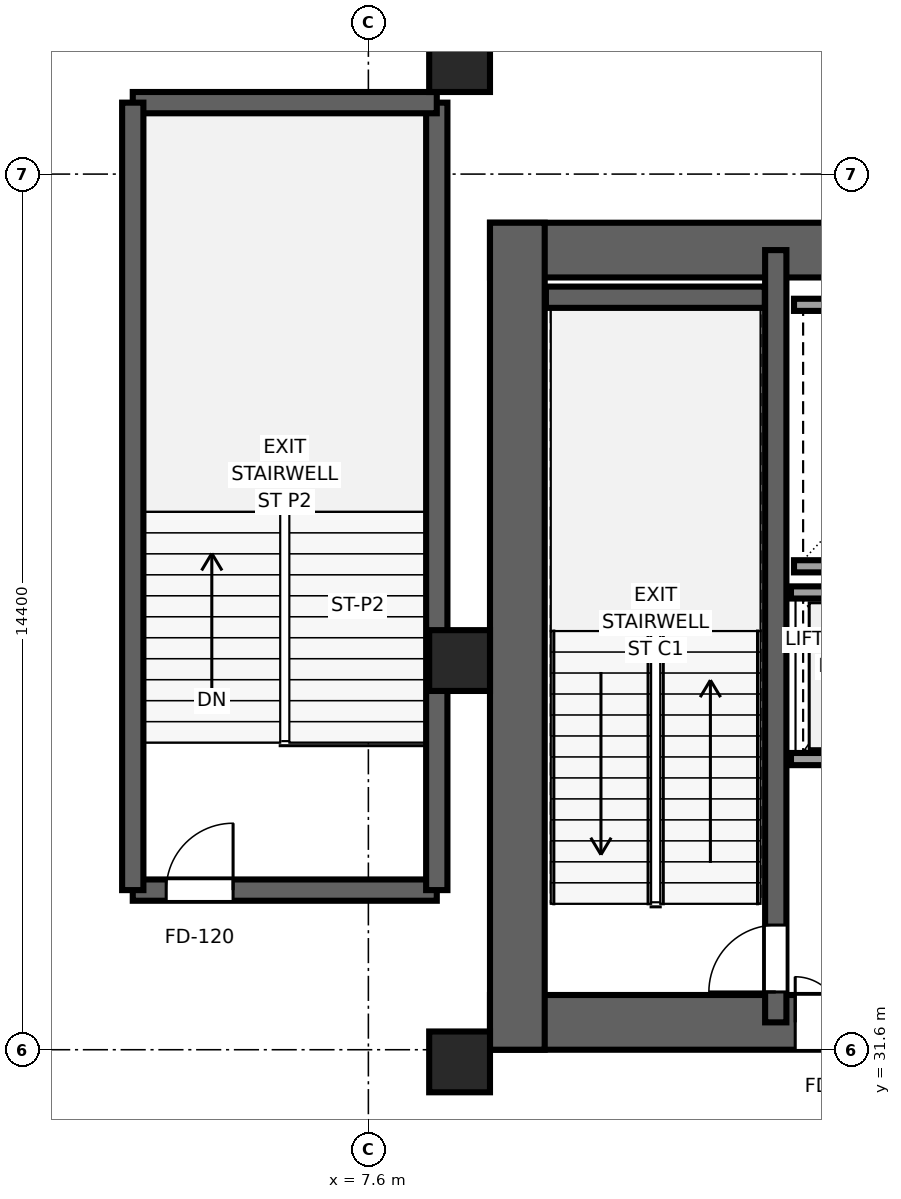
"""IFC4 building model, lengths in metres.
Left out: names, types, materials, properties, quantities, classifications, styles, units other than length and angle.
Written with IfcOpenShell. Run it as: python <this file> out.ifc"""

import sys

from ifc_helpers import new_model, si_unit, direction, frame, frame_2d, origin, origin_2d, place, context, subcontext, project, spatial, rectangle, extrude, source, transform, mapped, element, fill, save


model = new_model("IFC4")
c1 = context("Model", 3, precision=1e-05, world=origin(), true_north=direction((0.0, 1.0)))
c2 = subcontext(c1, "Body", "Model", "MODEL_VIEW")
j1 = project(units=[si_unit("LENGTHUNIT", "METRE"), si_unit("PLANEANGLEUNIT", "RADIAN")], contexts=[c1])
p1 = place(None, origin())
s1 = spatial("IfcSite", under=j1, at=p1, CompositionType="ELEMENT")
p2 = place(p1, origin())
s2 = spatial("IfcBuilding", under=s1, at=p2, CompositionType="ELEMENT")
p3 = place(p2, frame((0.0, 0.0, 26.8)))
s3 = spatial("IfcBuildingStorey", under=s2, at=p3, CompositionType="ELEMENT", Elevation=26.8)
p4 = place(p3, frame((9.6, 32.05, 0.0), z_axis=(0.0, 0.0, 1.0), x_axis=(1.0, 0.0, 0.0)))
e1 = element("IfcWall", 1, at=p4, inside=s3, PredefinedType="SHEAR", context=c2, shape_type="SweptSolid", body=[
    extrude(rectangle(XDim=26.8, YDim=0.9, at=frame_2d((13.4, 0.0))), origin(), (0.0, 0.0, 1.0), 5.2),
])
p5 = place(p4, frame((6.52, 0.0, 0.0), z_axis=(0.0, 0.0, 1.0), x_axis=(-1.0, 0.0, 0.0)))
e2 = element("IfcOpeningElement", 2, at=p5, cuts=e1, PredefinedType="OPENING", context=c2, shape_type="SweptSolid", body=[
    extrude(rectangle(XDim=1.5, YDim=2.04, at=frame_2d((0.75, 1.02))), frame((0.0, 0.46, 0.0), z_axis=(0.0, -1.0, 0.0), x_axis=(1.0, 0.0, 0.0)), (0.0, 0.0, 1.0), 0.92),
])
p6 = place(p4, frame((14.15, 0.0, 0.0), z_axis=(0.0, 0.0, 1.0), x_axis=(-1.0, 0.0, 0.0)))
e3 = element("IfcOpeningElement", 3, at=p6, cuts=e1, PredefinedType="OPENING", context=c2, shape_type="SweptSolid", body=[
    extrude(rectangle(XDim=1.5, YDim=2.04, at=frame_2d((0.75, 1.02))), frame((0.0, 0.46, 0.0), z_axis=(0.0, -1.0, 0.0), x_axis=(1.0, 0.0, 0.0)), (0.0, 0.0, 1.0), 0.92),
])
p7 = place(p4, frame((21.78, 0.0, 0.0), z_axis=(0.0, 0.0, 1.0), x_axis=(-1.0, 0.0, 0.0)))
e4 = element("IfcOpeningElement", 4, at=p7, cuts=e1, PredefinedType="OPENING", context=c2, shape_type="SweptSolid", body=[
    extrude(rectangle(XDim=1.5, YDim=2.04, at=frame_2d((0.75, 1.02))), frame((0.0, 0.46, 0.0), z_axis=(0.0, -1.0, 0.0), x_axis=(1.0, 0.0, 0.0)), (0.0, 0.0, 1.0), 0.92),
])
p8 = place(p4, frame((8.57, 0.0, 0.0), z_axis=(0.0, 0.0, 1.0), x_axis=(-1.0, 0.0, 0.0)))
e5 = element("IfcOpeningElement", 5, at=p8, cuts=e1, PredefinedType="OPENING", context=c2, shape_type="SweptSolid", body=[
    extrude(rectangle(XDim=0.82, YDim=2.01, at=frame_2d((0.41, 1.005))), frame((0.0, 0.46, 0.0), z_axis=(0.0, -1.0, 0.0), x_axis=(1.0, 0.0, 0.0)), (0.0, 0.0, 1.0), 0.92),
])
p9 = place(p4, frame((19.07, 0.0, 0.0), z_axis=(0.0, 0.0, 1.0), x_axis=(-1.0, 0.0, 0.0)))
e6 = element("IfcOpeningElement", 6, at=p9, cuts=e1, PredefinedType="OPENING", context=c2, shape_type="SweptSolid", body=[
    extrude(rectangle(XDim=0.82, YDim=2.01, at=frame_2d((0.41, 1.005))), frame((0.0, 0.46, 0.0), z_axis=(0.0, -1.0, 0.0), x_axis=(1.0, 0.0, 0.0)), (0.0, 0.0, 1.0), 0.92),
])
p10 = place(p3, frame((9.6, 44.75, 0.0), z_axis=(0.0, 0.0, 1.0), x_axis=(1.0, 0.0, 0.0)))
e7 = element("IfcWall", 7, at=p10, inside=s3, PredefinedType="SHEAR", context=c2, shape_type="SweptSolid", body=[
    extrude(rectangle(XDim=26.8, YDim=0.9, at=frame_2d((13.4, 0.0))), origin(), (0.0, 0.0, 1.0), 5.2),
])
p11 = place(p3, frame((10.05, 31.6, 0.0), z_axis=(0.0, 0.0, 1.0), x_axis=(0.0, 1.0, 0.0)))
e8 = element("IfcWall", 8, at=p11, inside=s3, PredefinedType="SHEAR", context=c2, shape_type="SweptSolid", body=[
    extrude(rectangle(XDim=13.6, YDim=0.9, at=frame_2d((6.8, 0.0))), origin(), (0.0, 0.0, 1.0), 5.2),
])
p12 = place(p3, frame((14.3, 32.05, 0.0), z_axis=(0.0, 0.0, 1.0), x_axis=(0.0, 1.0, 0.0)))
e9 = element("IfcWall", 9, at=p12, inside=s3, PredefinedType="SHEAR", context=c2, shape_type="SweptSolid", body=[
    extrude(rectangle(XDim=12.7, YDim=0.35, at=frame_2d((6.35, 0.0))), origin(), (0.0, 0.0, 1.0), 5.2),
])
p13 = place(p12, frame((0.5, 0.0, 0.0)))
e10 = element("IfcOpeningElement", 10, at=p13, cuts=e9, PredefinedType="OPENING", context=c2, shape_type="SweptSolid", body=[
    extrude(rectangle(XDim=1.1, YDim=2.12, at=frame_2d((0.55, 1.06))), frame((0.0, 0.185, 0.0), z_axis=(0.0, -1.0, 0.0), x_axis=(1.0, 0.0, 0.0)), (0.0, 0.0, 1.0), 0.37),
])
p14 = place(p3, frame((10.52, 43.975, 0.0), z_axis=(0.0, 0.0, 1.0), x_axis=(1.0, 0.0, 0.0)))
e11 = element("IfcWall", 11, at=p14, inside=s3, PredefinedType="SHEAR", context=c2, shape_type="SweptSolid", body=[
    extrude(rectangle(XDim=3.6, YDim=0.35, at=frame_2d((1.8, 0.0))), origin(), (0.0, 0.0, 1.0), 5.2),
])
p15 = place(p3, frame((3.725, 34.225, 0.0), z_axis=(0.0, 0.0, 1.0), x_axis=(1.0, 0.0, 0.0)))
e12 = element("IfcWall", 12, at=p15, inside=s3, PredefinedType="SHEAR", context=c2, shape_type="SweptSolid", body=[
    extrude(rectangle(XDim=5.0, YDim=0.35, at=frame_2d((2.5, 0.0))), origin(), (0.0, 0.0, 1.0), 5.2),
])
p16 = place(p15, frame((0.55, 0.0, 0.0)))
e13 = element("IfcOpeningElement", 13, at=p16, cuts=e12, PredefinedType="OPENING", context=c2, shape_type="SweptSolid", body=[
    extrude(rectangle(XDim=1.1, YDim=2.12, at=frame_2d((0.55, 1.06))), frame((0.0, 0.185, 0.0), z_axis=(0.0, -1.0, 0.0), x_axis=(1.0, 0.0, 0.0)), (0.0, 0.0, 1.0), 0.37),
])
p17 = place(p3, frame((8.725, 34.225, 0.0), z_axis=(0.0, 0.0, 1.0), x_axis=(0.0, 1.0, 0.0)))
e14 = element("IfcWall", 14, at=p17, inside=s3, PredefinedType="SHEAR", context=c2, shape_type="SweptSolid", body=[
    extrude(rectangle(XDim=12.95, YDim=0.35, at=frame_2d((6.475, 0.0))), origin(), (0.0, 0.0, 1.0), 5.2),
])
p18 = place(p3, frame((8.725, 47.175, 0.0), z_axis=(0.0, 0.0, 1.0), x_axis=(-1.0, 0.0, 0.0)))
e15 = element("IfcWall", 15, at=p18, inside=s3, PredefinedType="SHEAR", context=c2, shape_type="SweptSolid", body=[
    extrude(rectangle(XDim=5.0, YDim=0.35, at=frame_2d((2.5, 0.0))), origin(), (0.0, 0.0, 1.0), 5.2),
])
p19 = place(p3, frame((3.725, 47.175, 0.0), z_axis=(0.0, 0.0, 1.0), x_axis=(0.0, -1.0, 0.0)))
e16 = element("IfcWall", 16, at=p19, inside=s3, PredefinedType="SHEAR", context=c2, shape_type="SweptSolid", body=[
    extrude(rectangle(XDim=12.95, YDim=0.35, at=frame_2d((6.475, 0.0))), origin(), (0.0, 0.0, 1.0), 5.2),
])
m1 = source(origin(), c2, "Body", "SweptSolid", [
    extrude(rectangle(XDim=1.0, YDim=1.0, at=origin_2d()), origin(), (0.0, 0.0, 1.0), 5.2),
])
for number, where, z_axis, x_axis in (
    (17, (9.1, 47.85, 0.0), (0.0, 0.0, 1.0), (1.0, 0.0, 0.0)),
    (18, (9.1, 38.0, 0.0), (0.0, 0.0, 1.0), (1.0, 0.0, 0.0)),
    (19, (9.1, 31.4, 0.0), (0.0, 0.0, 1.0), (1.0, 0.0, 0.0)),
):
    element("IfcColumn", number, at=place(p3, frame(where, z_axis=z_axis, x_axis=x_axis)), inside=s3, PredefinedType="COLUMN", context=c2, shape_type="MappedRepresentation", body=[
        mapped(m1, transform((0.0, 0.0, 0.0), x_axis=(1.0, 0.0, 0.0), y_axis=(0.0, 1.0, 0.0), z_axis=(0.0, 0.0, 1.0), scale=1.0)),
    ])
for number, where, z_axis, x_axis in (
    (20, (14.6, 39.55, 0.0), (0.0, 0.0, 1.0), (1.0, 0.0, 0.0)),
    (21, (14.6, 43.85, 0.0), (0.0, 0.0, 1.0), (1.0, 0.0, 0.0)),
):
    element("IfcWall", number, at=place(p3, frame(where, z_axis=z_axis, x_axis=x_axis)), inside=s3, PredefinedType="SOLIDWALL", context=c2, shape_type="SweptSolid", body=[
        extrude(rectangle(XDim=4.1, YDim=0.2, at=frame_2d((2.05, 0.0))), origin(), (0.0, 0.0, 1.0), 4.94),
    ])
p20 = place(p3, frame((14.55, 36.38, 0.0), z_axis=(0.0, 0.0, 1.0), x_axis=(1.0, 0.0, 0.0)))
e22 = element("IfcWall", 22, at=p20, inside=s3, PredefinedType="SOLIDWALL", context=c2, shape_type="SweptSolid", body=[
    extrude(rectangle(XDim=4.075, YDim=0.2, at=frame_2d((2.038, 0.0))), origin(), (0.0, 0.0, 1.0), 4.94),
])
p21 = place(p20, frame((0.55, 0.0, 0.0)))
e23 = element("IfcOpeningElement", 23, at=p21, cuts=e22, PredefinedType="OPENING", context=c2, shape_type="SweptSolid", body=[
    extrude(rectangle(XDim=1.1, YDim=2.12, at=frame_2d((0.55, 1.06))), frame((0.0, 0.11, 0.0), z_axis=(0.0, -1.0, 0.0), x_axis=(1.0, 0.0, 0.0)), (0.0, 0.0, 1.0), 0.22),
])
p22 = place(p20, frame((2.45, 0.0, 0.0)))
e24 = element("IfcOpeningElement", 24, at=p22, cuts=e22, PredefinedType="OPENING", context=c2, shape_type="SweptSolid", body=[
    extrude(rectangle(XDim=1.1, YDim=2.12, at=frame_2d((0.55, 1.06))), frame((0.0, 0.11, 0.0), z_axis=(0.0, -1.0, 0.0), x_axis=(1.0, 0.0, 0.0)), (0.0, 0.0, 1.0), 0.22),
])
p23 = place(p3, frame((14.55, 39.12, 0.0), z_axis=(0.0, 0.0, 1.0), x_axis=(1.0, 0.0, 0.0)))
e25 = element("IfcWall", 25, at=p23, inside=s3, PredefinedType="SOLIDWALL", context=c2, shape_type="SweptSolid", body=[
    extrude(rectangle(XDim=4.075, YDim=0.2, at=frame_2d((2.038, 0.0))), origin(), (0.0, 0.0, 1.0), 4.94),
])
m2 = source(origin(), c2, "Body", "SweptSolid", [
    extrude(rectangle(XDim=1.1, YDim=2.12, at=frame_2d((0.55, 1.06))), frame((0.0, 0.025, 0.0), z_axis=(0.0, -1.0, 0.0), x_axis=(1.0, 0.0, 0.0)), (0.0, 0.0, 1.0), 0.05),
])
p24 = place(p13, origin())
e26 = element("IfcDoor", 26, at=p24, inside=s3, OperationType="SINGLE_SWING_LEFT", PredefinedType="DOOR", context=c2, shape_type="MappedRepresentation", body=[
    mapped(m2, transform((0.0, 0.0, 0.0), x_axis=(1.0, 0.0, 0.0), y_axis=(0.0, 1.0, 0.0), z_axis=(0.0, 0.0, 1.0), scale=1.0)),
])
fill(e10, e26)
p25 = place(p16, origin())
e27 = element("IfcDoor", 27, at=p25, inside=s3, OperationType="SINGLE_SWING_RIGHT", PredefinedType="DOOR", context=c2, shape_type="MappedRepresentation", body=[
    mapped(m2, transform((0.0, 0.0, 0.0), x_axis=(1.0, 0.0, 0.0), y_axis=(0.0, 1.0, 0.0), z_axis=(0.0, 0.0, 1.0), scale=1.0)),
])
fill(e13, e27)
m3 = source(origin(), c2, "Body", "SweptSolid", [
    extrude(rectangle(XDim=1.5, YDim=2.04, at=frame_2d((0.75, 1.02))), frame((0.0, 0.025, 0.0), z_axis=(0.0, -1.0, 0.0), x_axis=(1.0, 0.0, 0.0)), (0.0, 0.0, 1.0), 0.05),
])
p26 = place(p5, origin())
e28 = element("IfcDoor", 28, at=p26, inside=s3, OperationType="DOUBLE_DOOR_SINGLE_SWING", PredefinedType="DOOR", context=c2, shape_type="MappedRepresentation", body=[
    mapped(m3, transform((0.0, 0.0, 0.0), x_axis=(1.0, 0.0, 0.0), y_axis=(0.0, 1.0, 0.0), z_axis=(0.0, 0.0, 1.0), scale=1.0)),
])
fill(e2, e28)
save(model, sys.argv[1])
